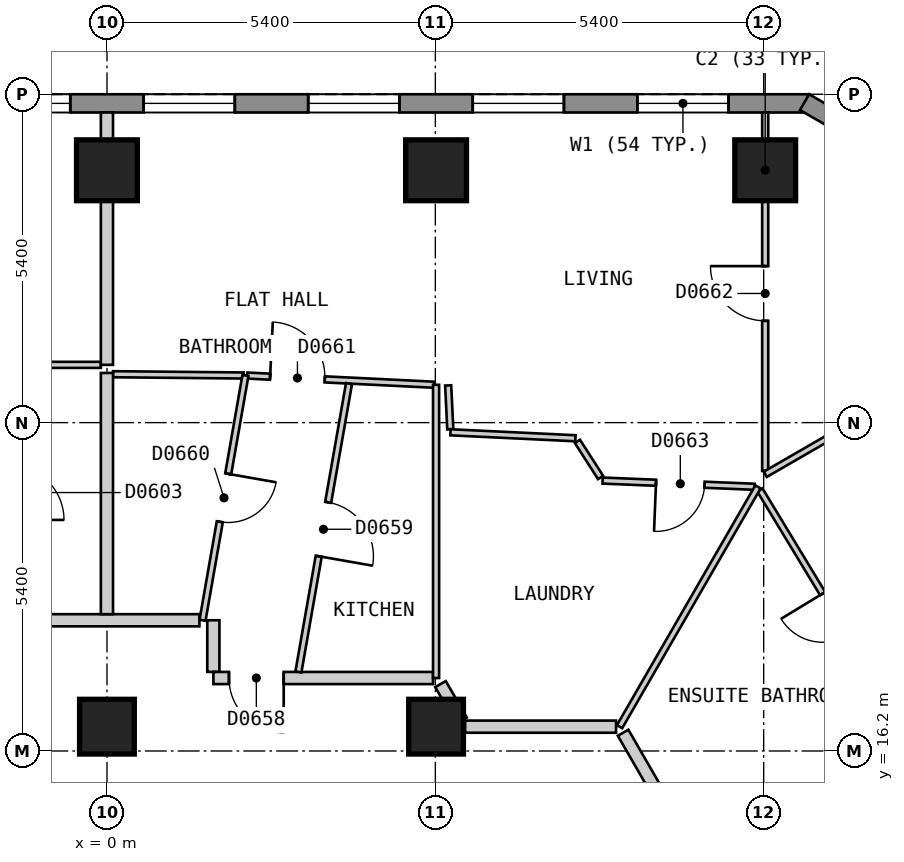
"""IFC4 building model, lengths in metres.
Left out: names, types, materials, properties, quantities, classifications, styles, units other than length and angle.
Written with IfcOpenShell. Run it as: python <this file> out.ifc"""

import sys

from ifc_helpers import new_model, si_unit, direction, frame, frame_2d, origin, origin_2d, place, context, subcontext, project, spatial, polyline, rectangle, outline, extrude, element, fill, save


model = new_model("IFC4")
c1 = context("Model", 3, precision=1e-05, world=origin(), true_north=direction((0.0, 1.0)))
c2 = subcontext(c1, "Body", "Model", "MODEL_VIEW")
j1 = project(units=[si_unit("LENGTHUNIT", "METRE"), si_unit("PLANEANGLEUNIT", "RADIAN")], contexts=[c1])
p1 = place(None, origin())
s1 = spatial("IfcSite", under=j1, at=p1, CompositionType="ELEMENT")
p2 = place(p1, origin())
s2 = spatial("IfcBuilding", under=s1, at=p2, CompositionType="ELEMENT")
p3 = place(p2, frame((0.0, 0.0, 75.0)))
s3 = spatial("IfcBuildingStorey", under=s2, at=p3, CompositionType="ELEMENT", Elevation=75.0)
for number, where, z_axis, x_axis in (
    (1, (10.825, 25.75, 0.0), (0.0, 0.0, 1.0), (-1.0, 0.0, 0.0)),
    (2, (5.412, 25.75, 0.0), (0.0, 0.0, 1.0), (-1.0, 0.0, 0.0)),
    (3, (-0.001, 25.75, 0.0), (0.0, 0.0, 1.0), (-1.0, 0.0, 0.0)),
):
    element("IfcColumn", number, at=place(p3, frame(where, z_axis=z_axis, x_axis=x_axis)), inside=s3, PredefinedType="COLUMN", context=c2, shape_type="SweptSolid", body=[
        extrude(rectangle(XDim=1.0, YDim=1.0, at=origin_2d()), origin(), (0.0, 0.0, 1.0), 3.0),
    ])
for number, where, z_axis, x_axis in (
    (4, (5.412, 16.6, 0.0), (0.0, 0.0, 1.0), (-1.0, 0.0, 0.0)),
    (5, (-0.001, 16.6, 0.0), (0.0, 0.0, 1.0), (-1.0, 0.0, 0.0)),
):
    element("IfcColumn", number, at=place(p3, frame(where, z_axis=z_axis, x_axis=x_axis)), inside=s3, PredefinedType="COLUMN", context=c2, shape_type="SweptSolid", body=[
        extrude(rectangle(XDim=0.9, YDim=0.9, at=origin_2d()), origin(), (0.0, 0.0, 1.0), 3.0),
    ])
p4 = place(p3, frame((11.547, 26.85, 0.0), z_axis=(0.0, 0.0, 1.0), x_axis=(-1.0, 0.0, 0.0)))
e6 = element("IfcWall", 6, at=p4, inside=s3, PredefinedType="SOLIDWALL", context=c2, shape_type="SweptSolid", body=[
    extrude(outline(polyline([(0.0, -0.15), (23.094, -0.15), (23.014, 0.15), (0.08, 0.15), (0.0, -0.15)])), origin(), (0.0, 0.0, 1.0), 2.7),
])
p5 = place(p4, frame((1.325, 0.0, 0.15)))
e7 = element("IfcOpeningElement", 7, at=p5, cuts=e6, PredefinedType="OPENING", context=c2, shape_type="SweptSolid", body=[
    extrude(rectangle(XDim=1.5, YDim=2.1, at=frame_2d((0.75, 1.05))), frame((0.0, 0.16, 0.0), z_axis=(0.0, -1.0, 0.0), x_axis=(1.0, 0.0, 0.0)), (0.0, 0.0, 1.0), 0.32),
])
p6 = place(p4, frame((4.032, 0.0, 0.15)))
e8 = element("IfcOpeningElement", 8, at=p6, cuts=e6, PredefinedType="OPENING", context=c2, shape_type="SweptSolid", body=[
    extrude(rectangle(XDim=1.5, YDim=2.1, at=frame_2d((0.75, 1.05))), frame((0.0, 0.16, 0.0), z_axis=(0.0, -1.0, 0.0), x_axis=(1.0, 0.0, 0.0)), (0.0, 0.0, 1.0), 0.32),
])
p7 = place(p4, frame((6.738, 0.0, 0.15)))
e9 = element("IfcOpeningElement", 9, at=p7, cuts=e6, PredefinedType="OPENING", context=c2, shape_type="SweptSolid", body=[
    extrude(rectangle(XDim=1.5, YDim=2.1, at=frame_2d((0.75, 1.05))), frame((0.0, 0.16, 0.0), z_axis=(0.0, -1.0, 0.0), x_axis=(1.0, 0.0, 0.0)), (0.0, 0.0, 1.0), 0.32),
])
p8 = place(p4, frame((9.445, 0.0, 0.15)))
e10 = element("IfcOpeningElement", 10, at=p8, cuts=e6, PredefinedType="OPENING", context=c2, shape_type="SweptSolid", body=[
    extrude(rectangle(XDim=1.5, YDim=2.1, at=frame_2d((0.75, 1.05))), frame((0.0, 0.16, 0.0), z_axis=(0.0, -1.0, 0.0), x_axis=(1.0, 0.0, 0.0)), (0.0, 0.0, 1.0), 0.32),
])
p9 = place(p4, frame((12.151, 0.0, 0.15)))
e11 = element("IfcOpeningElement", 11, at=p9, cuts=e6, PredefinedType="OPENING", context=c2, shape_type="SweptSolid", body=[
    extrude(rectangle(XDim=1.5, YDim=2.1, at=frame_2d((0.75, 1.05))), frame((0.0, 0.16, 0.0), z_axis=(0.0, -1.0, 0.0), x_axis=(1.0, 0.0, 0.0)), (0.0, 0.0, 1.0), 0.32),
])
p10 = place(p4, frame((14.858, 0.0, 0.15)))
e12 = element("IfcOpeningElement", 12, at=p10, cuts=e6, PredefinedType="OPENING", context=c2, shape_type="SweptSolid", body=[
    extrude(rectangle(XDim=1.5, YDim=2.1, at=frame_2d((0.75, 1.05))), frame((0.0, 0.16, 0.0), z_axis=(0.0, -1.0, 0.0), x_axis=(1.0, 0.0, 0.0)), (0.0, 0.0, 1.0), 0.32),
])
p11 = place(p4, frame((17.564, 0.0, 0.15)))
e13 = element("IfcOpeningElement", 13, at=p11, cuts=e6, PredefinedType="OPENING", context=c2, shape_type="SweptSolid", body=[
    extrude(rectangle(XDim=1.5, YDim=2.1, at=frame_2d((0.75, 1.05))), frame((0.0, 0.16, 0.0), z_axis=(0.0, -1.0, 0.0), x_axis=(1.0, 0.0, 0.0)), (0.0, 0.0, 1.0), 0.32),
])
p12 = place(p4, frame((20.271, 0.0, 0.15)))
e14 = element("IfcOpeningElement", 14, at=p12, cuts=e6, PredefinedType="OPENING", context=c2, shape_type="SweptSolid", body=[
    extrude(rectangle(XDim=1.5, YDim=2.1, at=frame_2d((0.75, 1.05))), frame((0.0, 0.16, 0.0), z_axis=(0.0, -1.0, 0.0), x_axis=(1.0, 0.0, 0.0)), (0.0, 0.0, 1.0), 0.32),
])
p13 = place(p3, frame((15.802, 24.37, 0.0), z_axis=(0.0, 0.0, 1.0), x_axis=(-0.866022959057, 0.500004234368, 0.0)))
e15 = element("IfcWall", 15, at=p13, inside=s3, PredefinedType="SOLIDWALL", context=c2, shape_type="SweptSolid", body=[
    extrude(outline(polyline([(0.0, -0.15), (5.0, -0.15), (4.92, 0.15), (0.08, 0.15), (0.0, -0.15)])), origin(), (0.0, 0.0, 1.0), 2.7),
])
p14 = place(p13, frame((0.65, 0.0, 0.15)))
e16 = element("IfcOpeningElement", 16, at=p14, cuts=e15, PredefinedType="OPENING", context=c2, shape_type="SweptSolid", body=[
    extrude(rectangle(XDim=1.2, YDim=2.1, at=frame_2d((0.6, 1.05))), frame((0.0, 0.16, 0.0), z_axis=(0.0, -1.0, 0.0), x_axis=(1.0, 0.0, 0.0)), (0.0, 0.0, 1.0), 0.32),
])
p15 = place(p13, frame((3.15, 0.0, 0.15)))
e17 = element("IfcOpeningElement", 17, at=p15, cuts=e15, PredefinedType="OPENING", context=c2, shape_type="SweptSolid", body=[
    extrude(rectangle(XDim=1.2, YDim=2.1, at=frame_2d((0.6, 1.05))), frame((0.0, 0.16, 0.0), z_axis=(0.0, -1.0, 0.0), x_axis=(1.0, 0.0, 0.0)), (0.0, 0.0, 1.0), 0.32),
])
p16 = place(p3, frame((5.485, 17.3, 0.0), z_axis=(0.0, 0.0, 1.0), x_axis=(0.499437640892, -0.866349838611, 0.0)))
e18 = element("IfcWall", 18, at=p16, inside=s3, PredefinedType="PARTITIONING", context=c2, shape_type="SweptSolid", body=[
    extrude(rectangle(XDim=0.693, YDim=0.2, at=frame_2d((0.346, 0.0))), origin(), (0.0, 0.0, 1.0), 2.7),
])
p17 = place(p3, frame((8.488, 16.5, 0.0), z_axis=(0.0, 0.0, 1.0), x_axis=(0.499986836607, -0.86603300354, 0.0)))
e19 = element("IfcWall", 19, at=p17, inside=s3, PredefinedType="PARTITIONING", context=c2, shape_type="SweptSolid", body=[
    extrude(rectangle(XDim=20.09, YDim=0.2, at=frame_2d((10.045, 0.0))), origin(), (0.0, 0.0, 1.0), 2.7),
])
p18 = place(p17, frame((14.569, 0.0, 0.0)))
e20 = element("IfcOpeningElement", 20, at=p18, cuts=e19, PredefinedType="OPENING", context=c2, shape_type="SweptSolid", body=[
    extrude(rectangle(XDim=1.0, YDim=2.1, at=frame_2d((0.5, 1.05))), frame((0.0, 0.11, 0.0), z_axis=(0.0, -1.0, 0.0), x_axis=(1.0, 0.0, 0.0)), (0.0, 0.0, 1.0), 0.22),
])
p19 = place(p3, frame((1.749, 18.35, 0.0), z_axis=(0.0, 0.0, 1.0), x_axis=(0.0, -1.0, 0.0)))
e21 = element("IfcWall", 21, at=p19, inside=s3, PredefinedType="PARTITIONING", context=c2, shape_type="SweptSolid", body=[
    extrude(rectangle(XDim=0.849, YDim=0.2, at=frame_2d((0.425, 0.0))), origin(), (0.0, 0.0, 1.0), 2.7),
])
p20 = place(p3, frame((5.889, 16.6, 0.0), z_axis=(0.0, 0.0, 1.0), x_axis=(1.0, 0.0, 0.0)))
e22 = element("IfcWall", 22, at=p20, inside=s3, PredefinedType="PARTITIONING", context=c2, shape_type="SweptSolid", body=[
    extrude(rectangle(XDim=2.483, YDim=0.2, at=frame_2d((1.242, 0.0))), origin(), (0.0, 0.0, 1.0), 2.7),
])
p21 = place(p3, frame((1.75, 17.4, 0.0), z_axis=(0.0, 0.0, 1.0), x_axis=(1.0, 0.0, 0.0)))
e23 = element("IfcWall", 23, at=p21, inside=s3, PredefinedType="PARTITIONING", context=c2, shape_type="SweptSolid", body=[
    extrude(rectangle(XDim=3.612, YDim=0.2, at=frame_2d((1.806, 0.0))), origin(), (0.0, 0.0, 1.0), 2.7),
])
p22 = place(p21, frame((0.256, 0.0, 0.0)))
e24 = element("IfcOpeningElement", 24, at=p22, cuts=e23, PredefinedType="OPENING", context=c2, shape_type="SweptSolid", body=[
    extrude(rectangle(XDim=0.9, YDim=2.1, at=frame_2d((0.45, 1.05))), frame((0.0, 0.11, 0.0), z_axis=(0.0, -1.0, 0.0), x_axis=(1.0, 0.0, 0.0)), (0.0, 0.0, 1.0), 0.22),
])
p23 = place(p3, frame((-5.314, 18.35, 0.0), z_axis=(0.0, 0.0, 1.0), x_axis=(1.0, 0.0, 0.0)))
e25 = element("IfcWall", 25, at=p23, inside=s3, PredefinedType="PARTITIONING", context=c2, shape_type="SweptSolid", body=[
    extrude(rectangle(XDim=6.834, YDim=0.2, at=frame_2d((3.417, 0.0))), origin(), (0.0, 0.0, 1.0), 2.7),
])
p24 = place(p23, frame((2.106, 0.0, 0.0)))
e26 = element("IfcOpeningElement", 26, at=p24, cuts=e25, PredefinedType="OPENING", context=c2, shape_type="SweptSolid", body=[
    extrude(rectangle(XDim=1.0, YDim=2.1, at=frame_2d((0.5, 1.05))), frame((0.0, 0.11, 0.0), z_axis=(0.0, -1.0, 0.0), x_axis=(1.0, 0.0, 0.0)), (0.0, 0.0, 1.0), 0.22),
])
p25 = place(p3, frame((0.099, 22.396, 0.0), z_axis=(0.0, 0.0, 1.0), x_axis=(0.999952228611, -0.009774481889, 0.0)))
e27 = element("IfcWall", 27, at=p25, inside=s3, PredefinedType="PARTITIONING", context=c2, shape_type="SweptSolid", body=[
    extrude(rectangle(XDim=2.148, YDim=0.1, at=frame_2d((1.074, 0.0))), origin(), (0.0, 0.0, 1.0), 2.7),
])
p26 = place(p3, frame((7.737, 21.291, 0.0), z_axis=(0.0, 0.0, 1.0), x_axis=(0.540389876456, -0.841414749944, 0.0)))
e28 = element("IfcWall", 28, at=p26, inside=s3, PredefinedType="PARTITIONING", context=c2, shape_type="SweptSolid", body=[
    extrude(rectangle(XDim=0.705, YDim=0.1, at=frame_2d((0.353, 0.0))), origin(), (0.0, 0.0, 1.0), 2.7),
])
p27 = place(p3, frame((10.738, 20.492, 0.0), z_axis=(0.0, 0.0, 1.0), x_axis=(0.518100976056, -0.855319459974, 0.0)))
e29 = element("IfcWall", 29, at=p27, inside=s3, PredefinedType="PARTITIONING", context=c2, shape_type="SweptSolid", body=[
    extrude(rectangle(XDim=4.744, YDim=0.1, at=frame_2d((2.372, 0.0))), origin(), (0.0, 0.0, 1.0), 2.7),
])
p28 = place(p27, frame((1.992, 0.0, 0.0)))
e30 = element("IfcOpeningElement", 30, at=p28, cuts=e29, PredefinedType="OPENING", context=c2, shape_type="SweptSolid", body=[
    extrude(rectangle(XDim=0.8, YDim=2.1, at=frame_2d((0.4, 1.05))), frame((0.0, 0.06, 0.0), z_axis=(0.0, -1.0, 0.0), x_axis=(1.0, 0.0, 0.0)), (0.0, 0.0, 1.0), 0.12),
])
p29 = place(p3, frame((5.611, 22.212, 0.0), z_axis=(0.0, 0.0, 1.0), x_axis=(0.048368650834, -0.998829551834, 0.0)))
e31 = element("IfcWall", 31, at=p29, inside=s3, PredefinedType="PARTITIONING", context=c2, shape_type="SweptSolid", body=[
    extrude(rectangle(XDim=0.722, YDim=0.1, at=frame_2d((0.361, 0.0))), origin(), (0.0, 0.0, 1.0), 2.7),
])
p30 = place(p3, frame((8.151, 20.647, 0.0), z_axis=(0.0, 0.0, 1.0), x_axis=(0.999167241152, -0.040802257405, 0.0)))
e32 = element("IfcWall", 32, at=p30, inside=s3, PredefinedType="PARTITIONING", context=c2, shape_type="SweptSolid", body=[
    extrude(rectangle(XDim=2.501, YDim=0.1, at=frame_2d((1.25, 0.0))), origin(), (0.0, 0.0, 1.0), 2.7),
])
p31 = place(p30, frame((0.879, 0.0, 0.0)))
e33 = element("IfcOpeningElement", 33, at=p31, cuts=e32, PredefinedType="OPENING", context=c2, shape_type="SweptSolid", body=[
    extrude(rectangle(XDim=0.8, YDim=2.1, at=frame_2d((0.4, 1.05))), frame((0.0, 0.06, 0.0), z_axis=(0.0, -1.0, 0.0), x_axis=(1.0, 0.0, 0.0)), (0.0, 0.0, 1.0), 0.12),
])
p32 = place(p3, frame((5.649, 21.441, 0.0), z_axis=(0.0, 0.0, 1.0), x_axis=(0.998867332207, -0.047582062273, 0.0)))
e34 = element("IfcWall", 34, at=p32, inside=s3, PredefinedType="PARTITIONING", context=c2, shape_type="SweptSolid", body=[
    extrude(rectangle(XDim=2.058, YDim=0.1, at=frame_2d((1.029, 0.0))), origin(), (0.0, 0.0, 1.0), 2.7),
])
p33 = place(p3, frame((2.307, 22.374, 0.0), z_axis=(0.0, 0.0, 1.0), x_axis=(0.998794685853, -0.049083352695, 0.0)))
e35 = element("IfcWall", 35, at=p33, inside=s3, PredefinedType="PARTITIONING", context=c2, shape_type="SweptSolid", body=[
    extrude(rectangle(XDim=3.079, YDim=0.1, at=frame_2d((1.54, 0.0))), origin(), (0.0, 0.0, 1.0), 2.7),
])
p34 = place(p33, frame((0.376, 0.0, 0.0)))
e36 = element("IfcOpeningElement", 36, at=p34, cuts=e35, PredefinedType="OPENING", context=c2, shape_type="SweptSolid", body=[
    extrude(rectangle(XDim=0.9, YDim=2.1, at=frame_2d((0.45, 1.05))), frame((0.0, 0.06, 0.0), z_axis=(0.0, -1.0, 0.0), x_axis=(1.0, 0.0, 0.0)), (0.0, 0.0, 1.0), 0.12),
])
p35 = place(p3, frame((-5.384, 22.55, 0.0), z_axis=(0.0, 0.0, 1.0), x_axis=(1.0, 0.0, 0.0)))
e37 = element("IfcWall", 37, at=p35, inside=s3, PredefinedType="PARTITIONING", context=c2, shape_type="SweptSolid", body=[
    extrude(rectangle(XDim=5.283, YDim=0.1, at=frame_2d((2.642, 0.0))), origin(), (0.0, 0.0, 1.0), 2.7),
])
p36 = place(p35, frame((2.226, 0.0, 0.0)))
e38 = element("IfcOpeningElement", 38, at=p36, cuts=e37, PredefinedType="OPENING", context=c2, shape_type="SweptSolid", body=[
    extrude(rectangle(XDim=0.9, YDim=2.1, at=frame_2d((0.45, 1.05))), frame((0.0, 0.06, 0.0), z_axis=(0.0, -1.0, 0.0), x_axis=(1.0, 0.0, 0.0)), (0.0, 0.0, 1.0), 0.12),
])
p37 = place(p3, frame((8.43, 16.6, 0.0), z_axis=(0.0, 0.0, 1.0), x_axis=(0.499951460778, 0.866053426104, 0.0)))
e39 = element("IfcWall", 39, at=p37, inside=s3, PredefinedType="PARTITIONING", context=c2, shape_type="SweptSolid", body=[
    extrude(rectangle(XDim=4.553, YDim=0.1, at=frame_2d((2.276, 0.0))), origin(), (0.0, 0.0, 1.0), 2.7),
])
p38 = place(p3, frame((3.148, 17.5, 0.0), z_axis=(0.0, 0.0, 1.0), x_axis=(0.172821918451, 0.984953087463, 0.0)))
e40 = element("IfcWall", 40, at=p38, inside=s3, PredefinedType="PARTITIONING", context=c2, shape_type="SweptSolid", body=[
    extrude(rectangle(XDim=4.814, YDim=0.1, at=frame_2d((2.407, 0.0))), origin(), (0.0, 0.0, 1.0), 2.7),
])
p39 = place(p38, frame((1.932, 0.0, 0.0)))
e41 = element("IfcOpeningElement", 41, at=p39, cuts=e40, PredefinedType="OPENING", context=c2, shape_type="SweptSolid", body=[
    extrude(rectangle(XDim=0.9, YDim=2.1, at=frame_2d((0.45, 1.05))), frame((0.0, 0.06, 0.0), z_axis=(0.0, -1.0, 0.0), x_axis=(1.0, 0.0, 0.0)), (0.0, 0.0, 1.0), 0.12),
])
p40 = place(p3, frame((1.571, 18.35, 0.0), z_axis=(0.0, 0.0, 1.0), x_axis=(0.172742546726, 0.984967010895, 0.0)))
e42 = element("IfcWall", 42, at=p40, inside=s3, PredefinedType="PARTITIONING", context=c2, shape_type="SweptSolid", body=[
    extrude(rectangle(XDim=4.087, YDim=0.1, at=frame_2d((2.044, 0.0))), origin(), (0.0, 0.0, 1.0), 2.7),
])
p41 = place(p40, frame((1.644, 0.0, 0.0)))
e43 = element("IfcOpeningElement", 43, at=p41, cuts=e42, PredefinedType="OPENING", context=c2, shape_type="SweptSolid", body=[
    extrude(rectangle(XDim=0.8, YDim=2.1, at=frame_2d((0.4, 1.05))), frame((0.0, 0.06, 0.0), z_axis=(0.0, -1.0, 0.0), x_axis=(1.0, 0.0, 0.0)), (0.0, 0.0, 1.0), 0.12),
])
p42 = place(p3, frame((5.412, 17.4, 0.0), z_axis=(0.0, 0.0, 1.0), x_axis=(0.0, 1.0, 0.0)))
e44 = element("IfcWall", 44, at=p42, inside=s3, PredefinedType="PARTITIONING", context=c2, shape_type="SweptSolid", body=[
    extrude(rectangle(XDim=4.822, YDim=0.1, at=frame_2d((2.411, 0.0))), origin(), (0.0, 0.0, 1.0), 2.7),
])
p43 = place(p3, frame((10.825, 20.806, 0.0), z_axis=(0.0, 0.0, 1.0), x_axis=(0.0, 1.0, 0.0)))
e45 = element("IfcWall", 45, at=p43, inside=s3, PredefinedType="PARTITIONING", context=c2, shape_type="SweptSolid", body=[
    extrude(rectangle(XDim=5.894, YDim=0.1, at=frame_2d((2.947, 0.0))), origin(), (0.0, 0.0, 1.0), 2.7),
])
p44 = place(p43, frame((2.468, 0.0, 0.0)))
e46 = element("IfcOpeningElement", 46, at=p44, cuts=e45, PredefinedType="OPENING", context=c2, shape_type="SweptSolid", body=[
    extrude(rectangle(XDim=0.9, YDim=2.1, at=frame_2d((0.45, 1.05))), frame((0.0, 0.06, 0.0), z_axis=(0.0, -1.0, 0.0), x_axis=(1.0, 0.0, 0.0)), (0.0, 0.0, 1.0), 0.12),
])
p45 = place(p3, frame((10.826, 20.75, 0.0), z_axis=(0.0, 0.0, 1.0), x_axis=(0.865986712877, 0.50006700863, 0.0)))
e47 = element("IfcWall", 47, at=p45, inside=s3, PredefinedType="PARTITIONING", context=c2, shape_type="SweptSolid", body=[
    extrude(rectangle(XDim=5.949, YDim=0.1, at=frame_2d((2.975, 0.0))), origin(), (0.0, 0.0, 1.0), 2.7),
])
p46 = place(p45, frame((2.524, 0.0, 0.0)))
e48 = element("IfcOpeningElement", 48, at=p46, cuts=e47, PredefinedType="OPENING", context=c2, shape_type="SweptSolid", body=[
    extrude(rectangle(XDim=0.9, YDim=2.1, at=frame_2d((0.45, 1.05))), frame((0.0, 0.06, 0.0), z_axis=(0.0, -1.0, 0.0), x_axis=(1.0, 0.0, 0.0)), (0.0, 0.0, 1.0), 0.12),
])
p47 = place(p3, frame((-0.001, 18.45, 0.0), z_axis=(0.0, 0.0, 1.0), x_axis=(0.0, 1.0, 0.0)))
e49 = element("IfcWall", 49, at=p47, inside=s3, PredefinedType="PARTITIONING", context=c2, shape_type="SweptSolid", body=[
    extrude(rectangle(XDim=3.967, YDim=0.2, at=frame_2d((1.983, 0.0))), origin(), (0.0, 0.0, 1.0), 2.7),
])
p48 = place(p3, frame((-0.001, 22.55, 0.0), z_axis=(0.0, 0.0, 1.0), x_axis=(0.0, 1.0, 0.0)))
e50 = element("IfcWall", 50, at=p48, inside=s3, PredefinedType="PARTITIONING", context=c2, shape_type="SweptSolid", body=[
    extrude(rectangle(XDim=4.15, YDim=0.2, at=frame_2d((2.075, 0.0))), origin(), (0.0, 0.0, 1.0), 2.7),
])
p49 = place(p3, frame((9.83, 14.375, 0.0), z_axis=(0.0, 0.0, 1.0), x_axis=(0.866016855193, 0.500014806302, 0.0)))
e51 = element("IfcWall", 51, at=p49, inside=s3, PredefinedType="PARTITIONING", context=c2, shape_type="SweptSolid", body=[
    extrude(rectangle(XDim=10.0, YDim=0.2, at=frame_2d((5.0, 0.0))), origin(), (0.0, 0.0, 1.0), 2.7),
])
p50 = place(p5, origin())
e52 = element("IfcWindow", 52, at=p50, inside=s3, PartitioningType="SINGLE_PANEL", PredefinedType="WINDOW", context=c2, shape_type="SweptSolid", body=[
    extrude(rectangle(XDim=1.5, YDim=2.1, at=frame_2d((0.75, 1.05))), frame((0.0, 0.03, 0.0), z_axis=(0.0, -1.0, 0.0), x_axis=(1.0, 0.0, 0.0)), (0.0, 0.0, 1.0), 0.06),
])
fill(e7, e52)
p51 = place(p6, origin())
e53 = element("IfcWindow", 53, at=p51, inside=s3, PartitioningType="SINGLE_PANEL", PredefinedType="WINDOW", context=c2, shape_type="SweptSolid", body=[
    extrude(rectangle(XDim=1.5, YDim=2.1, at=frame_2d((0.75, 1.05))), frame((0.0, 0.03, 0.0), z_axis=(0.0, -1.0, 0.0), x_axis=(1.0, 0.0, 0.0)), (0.0, 0.0, 1.0), 0.06),
])
fill(e8, e53)
p52 = place(p7, origin())
e54 = element("IfcWindow", 54, at=p52, inside=s3, PartitioningType="SINGLE_PANEL", PredefinedType="WINDOW", context=c2, shape_type="SweptSolid", body=[
    extrude(rectangle(XDim=1.5, YDim=2.1, at=frame_2d((0.75, 1.05))), frame((0.0, 0.03, 0.0), z_axis=(0.0, -1.0, 0.0), x_axis=(1.0, 0.0, 0.0)), (0.0, 0.0, 1.0), 0.06),
])
fill(e9, e54)
p53 = place(p8, origin())
e55 = element("IfcWindow", 55, at=p53, inside=s3, PartitioningType="SINGLE_PANEL", PredefinedType="WINDOW", context=c2, shape_type="SweptSolid", body=[
    extrude(rectangle(XDim=1.5, YDim=2.1, at=frame_2d((0.75, 1.05))), frame((0.0, 0.03, 0.0), z_axis=(0.0, -1.0, 0.0), x_axis=(1.0, 0.0, 0.0)), (0.0, 0.0, 1.0), 0.06),
])
fill(e10, e55)
p54 = place(p9, origin())
e56 = element("IfcWindow", 56, at=p54, inside=s3, PartitioningType="SINGLE_PANEL", PredefinedType="WINDOW", context=c2, shape_type="SweptSolid", body=[
    extrude(rectangle(XDim=1.5, YDim=2.1, at=frame_2d((0.75, 1.05))), frame((0.0, 0.03, 0.0), z_axis=(0.0, -1.0, 0.0), x_axis=(1.0, 0.0, 0.0)), (0.0, 0.0, 1.0), 0.06),
])
fill(e11, e56)
p55 = place(p22, origin())
e57 = element("IfcDoor", 57, at=p55, inside=s3, OperationType="SINGLE_SWING_RIGHT", PredefinedType="DOOR", context=c2, shape_type="SweptSolid", body=[
    extrude(rectangle(XDim=0.9, YDim=2.1, at=frame_2d((0.45, 1.05))), frame((0.0, 0.025, 0.0), z_axis=(0.0, -1.0, 0.0), x_axis=(1.0, 0.0, 0.0)), (0.0, 0.0, 1.0), 0.05),
])
fill(e24, e57)
p56 = place(p39, origin())
e58 = element("IfcDoor", 58, at=p56, inside=s3, OperationType="SINGLE_SWING_LEFT", PredefinedType="DOOR", context=c2, shape_type="SweptSolid", body=[
    extrude(rectangle(XDim=0.9, YDim=2.1, at=frame_2d((0.45, 1.05))), frame((0.0, 0.025, 0.0), z_axis=(0.0, -1.0, 0.0), x_axis=(1.0, 0.0, 0.0)), (0.0, 0.0, 1.0), 0.05),
])
fill(e41, e58)
p57 = place(p41, origin())
e59 = element("IfcDoor", 59, at=p57, inside=s3, OperationType="SINGLE_SWING_RIGHT", PredefinedType="DOOR", context=c2, shape_type="SweptSolid", body=[
    extrude(rectangle(XDim=0.8, YDim=2.1, at=frame_2d((0.4, 1.05))), frame((0.0, 0.025, 0.0), z_axis=(0.0, -1.0, 0.0), x_axis=(1.0, 0.0, 0.0)), (0.0, 0.0, 1.0), 0.05),
])
fill(e43, e59)
p58 = place(p34, origin())
e60 = element("IfcDoor", 60, at=p58, inside=s3, OperationType="SINGLE_SWING_LEFT", PredefinedType="DOOR", context=c2, shape_type="SweptSolid", body=[
    extrude(rectangle(XDim=0.9, YDim=2.1, at=frame_2d((0.45, 1.05))), frame((0.0, 0.025, 0.0), z_axis=(0.0, -1.0, 0.0), x_axis=(1.0, 0.0, 0.0)), (0.0, 0.0, 1.0), 0.05),
])
fill(e36, e60)
p59 = place(p44, origin())
e61 = element("IfcDoor", 61, at=p59, inside=s3, OperationType="SINGLE_SWING_RIGHT", PredefinedType="DOOR", context=c2, shape_type="SweptSolid", body=[
    extrude(rectangle(XDim=0.9, YDim=2.1, at=frame_2d((0.45, 1.05))), frame((0.0, 0.025, 0.0), z_axis=(0.0, -1.0, 0.0), x_axis=(1.0, 0.0, 0.0)), (0.0, 0.0, 1.0), 0.05),
])
fill(e46, e61)
p60 = place(p31, origin())
e62 = element("IfcDoor", 62, at=p60, inside=s3, OperationType="SINGLE_SWING_LEFT", PredefinedType="DOOR", context=c2, shape_type="SweptSolid", body=[
    extrude(rectangle(XDim=0.8, YDim=2.1, at=frame_2d((0.4, 1.05))), frame((0.0, 0.025, 0.0), z_axis=(0.0, -1.0, 0.0), x_axis=(1.0, 0.0, 0.0)), (0.0, 0.0, 1.0), 0.05),
])
fill(e33, e62)
p61 = place(p28, origin())
e63 = element("IfcDoor", 63, at=p61, inside=s3, OperationType="SINGLE_SWING_LEFT", PredefinedType="DOOR", context=c2, shape_type="SweptSolid", body=[
    extrude(rectangle(XDim=0.8, YDim=2.1, at=frame_2d((0.4, 1.05))), frame((0.0, 0.025, 0.0), z_axis=(0.0, -1.0, 0.0), x_axis=(1.0, 0.0, 0.0)), (0.0, 0.0, 1.0), 0.05),
])
fill(e30, e63)
save(model, sys.argv[1])
